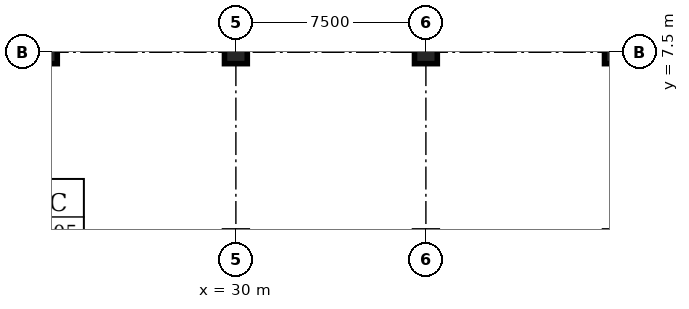
"""IFC4 building model, lengths in metres.
Left out: names, types, materials, properties, quantities, classifications, styles, units other than length and angle.
Written with IfcOpenShell. Run it as: python <this file> out.ifc"""

import sys

from ifc_helpers import new_model, si_unit, direction, frame, origin, origin_2d, place, context, subcontext, project, spatial, rectangle, circle, extrude, element, save


model = new_model("IFC4")
c1 = context("Model", 3, precision=1e-05, world=origin(), true_north=direction((0.0, 1.0)))
c2 = subcontext(c1, "Body", "Model", "MODEL_VIEW")
j1 = project(units=[si_unit("LENGTHUNIT", "METRE"), si_unit("PLANEANGLEUNIT", "RADIAN")], contexts=[c1])
p1 = place(None, origin())
s1 = spatial("IfcSite", under=j1, at=p1, CompositionType="ELEMENT")
p2 = place(p1, origin())
s2 = spatial("IfcBuilding", under=s1, at=p2, CompositionType="ELEMENT")
p3 = place(p2, frame((0.0, 0.0, -4.5)))
s3 = spatial("IfcBuildingStorey", under=s2, at=p3, CompositionType="ELEMENT", Elevation=-4.5)
for number, where, z_axis, x_axis in (
    (1, (22.5, 7.5, 0.0), (0.0, 0.0, 1.0), (1.0, 0.0, 0.0)),
    (2, (30.0, 7.5, 0.0), (0.0, 0.0, 1.0), (1.0, 0.0, 0.0)),
):
    element("IfcColumn", number, at=place(p3, frame(where, z_axis=z_axis, x_axis=x_axis)), inside=s3, PredefinedType="COLUMN", context=c2, shape_type="SweptSolid", body=[
        extrude(rectangle(XDim=0.9, YDim=0.9, at=origin_2d()), origin(), (0.0, 0.0, 1.0), 4.5),
    ])
p4 = place(p3, frame((37.5, 7.5, 0.0), z_axis=(0.0, 0.0, 1.0), x_axis=(1.0, 0.0, 0.0)))
e3 = element("IfcColumn", 3, at=p4, inside=s3, PredefinedType="COLUMN", context=c2, shape_type="SweptSolid", body=[
    extrude(circle(Radius=0.45, at=origin_2d()), origin(), (0.0, 0.0, 1.0), 4.5),
])
p5 = place(p3, frame((45.0, 7.5, 0.0), z_axis=(0.0, 0.0, 1.0), x_axis=(1.0, 0.0, 0.0)))
e4 = element("IfcColumn", 4, at=p5, inside=s3, PredefinedType="COLUMN", context=c2, shape_type="SweptSolid", body=[
    extrude(rectangle(XDim=0.9, YDim=0.9, at=origin_2d()), origin(), (0.0, 0.0, 1.0), 4.5),
])
save(model, sys.argv[1])
